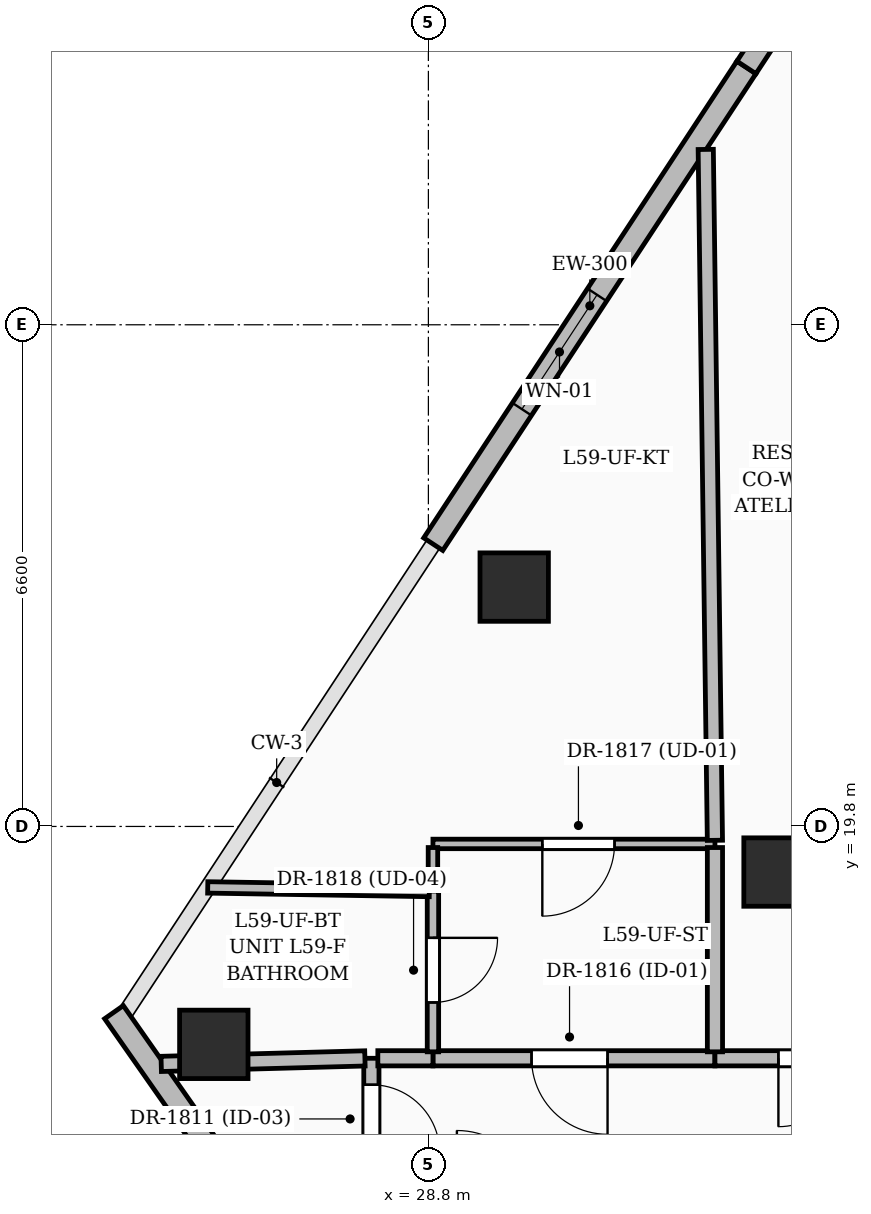
"""IFC4 building model, lengths in metres.
Left out: names, types, materials, properties, quantities, classifications, styles, units other than length and angle.
Written with IfcOpenShell. Run it as: python <this file> out.ifc"""

import sys

from ifc_helpers import new_model, si_unit, direction, frame, frame_2d, origin, origin_2d, place, context, subcontext, project, spatial, rectangle, extrude, element, fill, save


model = new_model("IFC4")
c1 = context("Model", 3, precision=1e-05, world=origin(), true_north=direction((0.0, 1.0)))
c2 = subcontext(c1, "Body", "Model", "MODEL_VIEW")
j1 = project(units=[si_unit("LENGTHUNIT", "METRE"), si_unit("PLANEANGLEUNIT", "RADIAN")], contexts=[c1])
p1 = place(None, origin())
s1 = spatial("IfcSite", under=j1, at=p1, CompositionType="ELEMENT")
p2 = place(p1, origin())
s2 = spatial("IfcBuilding", under=s1, at=p2, CompositionType="ELEMENT")
p3 = place(p2, frame((0.0, 0.0, 229.5)))
s3 = spatial("IfcBuildingStorey", under=s2, at=p3, CompositionType="ELEMENT", Elevation=229.5)
for number, where, z_axis, x_axis in (
    (1, (33.4, 19.2, 0.0), (0.0, 0.0, 1.0), (1.0, 0.0, 0.0)),
    (2, (29.929, 22.949, 0.0), (0.0, 0.0, 1.0), (1.0, 0.0, 0.0)),
    (3, (25.977, 16.933, 0.0), (0.0, 0.0, 1.0), (1.0, 0.0, 0.0)),
):
    element("IfcColumn", number, at=place(p3, frame(where, z_axis=z_axis, x_axis=x_axis)), inside=s3, PredefinedType="COLUMN", context=c2, shape_type="SweptSolid", body=[
        extrude(rectangle(XDim=0.9, YDim=0.9, at=origin_2d()), origin(), (0.0, 0.0, 1.0), 3.75),
    ])
p4 = place(p3, frame((26.151, 15.232, 0.0), z_axis=(0.0, 0.0, 1.0), x_axis=(-0.573607655321, 0.819130183644, 0.0)))
e4 = element("IfcWall", 4, at=p4, inside=s3, PredefinedType="SOLIDWALL", context=c2, shape_type="SweptSolid", body=[
    extrude(rectangle(XDim=2.593, YDim=0.3, at=frame_2d((1.297, 0.0))), origin(), (0.0, 0.0, 1.0), 2.825),
])
p5 = place(p3, frame((28.864, 23.514, 0.0), z_axis=(0.0, 0.0, 1.0), x_axis=(0.549033751048, 0.835800179595, 0.0)))
e5 = element("IfcWall", 5, at=p5, inside=s3, PredefinedType="SOLIDWALL", context=c2, shape_type="SweptSolid", body=[
    extrude(rectangle(XDim=7.504, YDim=0.3, at=frame_2d((3.752, 0.0))), origin(), (0.0, 0.0, 1.0), 3.5),
])
p6 = place(p5, frame((2.125, 0.0, 0.6)))
e6 = element("IfcOpeningElement", 6, at=p6, cuts=e5, PredefinedType="OPENING", context=c2, shape_type="SweptSolid", body=[
    extrude(rectangle(XDim=1.8, YDim=2.1, at=frame_2d((0.9, 1.05))), frame((0.0, 0.16, 0.0), z_axis=(0.0, -1.0, 0.0), x_axis=(1.0, 0.0, 0.0)), (0.0, 0.0, 1.0), 0.32),
])
p7 = place(p3, frame((32.984, 29.785, 0.0), z_axis=(0.0, 0.0, 1.0), x_axis=(0.549071408683, 0.835775441232, 0.0)))
e7 = element("IfcWall", 7, at=p7, inside=s3, PredefinedType="SOLIDWALL", context=c2, shape_type="SweptSolid", body=[
    extrude(rectangle(XDim=7.504, YDim=0.3, at=frame_2d((3.752, 0.0))), origin(), (0.0, 0.0, 1.0), 3.5),
])
p8 = place(p7, frame((0.85, 0.0, 0.55)))
e8 = element("IfcOpeningElement", 8, at=p8, cuts=e7, PredefinedType="OPENING", context=c2, shape_type="SweptSolid", body=[
    extrude(rectangle(XDim=1.6, YDim=2.2, at=frame_2d((0.8, 1.1))), frame((0.0, 0.16, 0.0), z_axis=(0.0, -1.0, 0.0), x_axis=(1.0, 0.0, 0.0)), (0.0, 0.0, 1.0), 0.32),
])
p9 = place(p7, frame((4.225, 0.0, 0.55)))
e9 = element("IfcOpeningElement", 9, at=p9, cuts=e7, PredefinedType="OPENING", context=c2, shape_type="SweptSolid", body=[
    extrude(rectangle(XDim=1.6, YDim=2.2, at=frame_2d((0.8, 1.1))), frame((0.0, 0.16, 0.0), z_axis=(0.0, -1.0, 0.0), x_axis=(1.0, 0.0, 0.0)), (0.0, 0.0, 1.0), 0.32),
])
p10 = place(p3, frame((28.05, 16.75, 0.0), z_axis=(0.0, 0.0, 1.0), x_axis=(0.0, -1.0, 0.0)))
e10 = element("IfcWall", 10, at=p10, inside=s3, PredefinedType="PARTITIONING", context=c2, shape_type="SweptSolid", body=[
    extrude(rectangle(XDim=1.7, YDim=0.2, at=frame_2d((0.85, 0.0))), origin(), (0.0, 0.0, 1.0), 3.5),
])
p11 = place(p10, frame((0.348, 0.0, 0.0)))
e11 = element("IfcOpeningElement", 11, at=p11, cuts=e10, PredefinedType="OPENING", context=c2, shape_type="SweptSolid", body=[
    extrude(rectangle(XDim=0.9, YDim=2.1, at=frame_2d((0.45, 1.05))), frame((0.0, 0.11, 0.0), z_axis=(0.0, -1.0, 0.0), x_axis=(1.0, 0.0, 0.0)), (0.0, 0.0, 1.0), 0.22),
])
p12 = place(p3, frame((32.57, 16.75, 0.0), z_axis=(0.0, 0.0, 1.0), x_axis=(-1.0, 0.0, 0.0)))
e12 = element("IfcWall", 12, at=p12, inside=s3, PredefinedType="PARTITIONING", context=c2, shape_type="SweptSolid", body=[
    extrude(rectangle(XDim=3.71, YDim=0.2, at=frame_2d((1.855, 0.0))), origin(), (0.0, 0.0, 1.0), 3.5),
])
p13 = place(p12, frame((1.413, 0.0, 0.0)))
e13 = element("IfcOpeningElement", 13, at=p13, cuts=e12, PredefinedType="OPENING", context=c2, shape_type="SweptSolid", body=[
    extrude(rectangle(XDim=1.0, YDim=2.2, at=frame_2d((0.5, 1.1))), frame((0.0, 0.11, 0.0), z_axis=(0.0, -1.0, 0.0), x_axis=(1.0, 0.0, 0.0)), (0.0, 0.0, 1.0), 0.22),
])
p14 = place(p3, frame((28.86, 16.75, 0.0), z_axis=(0.0, 0.0, 1.0), x_axis=(-1.0, 0.0, 0.0)))
e14 = element("IfcWall", 14, at=p14, inside=s3, PredefinedType="PARTITIONING", context=c2, shape_type="SweptSolid", body=[
    extrude(rectangle(XDim=0.725, YDim=0.2, at=frame_2d((0.363, 0.0))), origin(), (0.0, 0.0, 1.0), 3.5),
])
p15 = place(p3, frame((35.14, 16.75, 0.0), z_axis=(0.0, 0.0, 1.0), x_axis=(-1.0, 0.0, 0.0)))
e15 = element("IfcWall", 15, at=p15, inside=s3, PredefinedType="PARTITIONING", context=c2, shape_type="SweptSolid", body=[
    extrude(rectangle(XDim=2.57, YDim=0.2, at=frame_2d((1.285, 0.0))), origin(), (0.0, 0.0, 1.0), 2.685),
])
p16 = place(p15, frame((0.835, 0.0, 0.0)))
e16 = element("IfcOpeningElement", 16, at=p16, cuts=e15, PredefinedType="OPENING", context=c2, shape_type="SweptSolid", body=[
    extrude(rectangle(XDim=0.9, YDim=2.1, at=frame_2d((0.45, 1.05))), frame((0.0, 0.11, 0.0), z_axis=(0.0, -1.0, 0.0), x_axis=(1.0, 0.0, 0.0)), (0.0, 0.0, 1.0), 0.22),
])
p17 = place(p3, frame((27.965, 16.749, 0.0), z_axis=(0.0, 0.0, 1.0), x_axis=(-0.999634238385, -0.027044212862, 0.0)))
e17 = element("IfcWall", 17, at=p17, inside=s3, PredefinedType="PARTITIONING", context=c2, shape_type="SweptSolid", body=[
    extrude(rectangle(XDim=2.681, YDim=0.2, at=frame_2d((1.341, 0.0))), origin(), (0.0, 0.0, 1.0), 2.685),
])
p18 = place(p3, frame((32.57, 19.57, 0.0), z_axis=(0.0, 0.0, 1.0), x_axis=(-1.0, 0.0, 0.0)))
e18 = element("IfcWall", 18, at=p18, inside=s3, PredefinedType="PARTITIONING", context=c2, shape_type="SweptSolid", body=[
    extrude(rectangle(XDim=3.71, YDim=0.125, at=frame_2d((1.855, 0.0))), origin(), (0.0, 0.0, 1.0), 3.01),
])
p19 = place(p18, frame((1.321, 0.0, 0.0)))
e19 = element("IfcOpeningElement", 19, at=p19, cuts=e18, PredefinedType="OPENING", context=c2, shape_type="SweptSolid", body=[
    extrude(rectangle(XDim=0.95, YDim=2.2, at=frame_2d((0.475, 1.1))), frame((0.0, 0.072, 0.0), z_axis=(0.0, -1.0, 0.0), x_axis=(1.0, 0.0, 0.0)), (0.0, 0.0, 1.0), 0.145),
])
p20 = place(p3, frame((28.86, 19.522, 0.0), z_axis=(0.0, 0.0, 1.0), x_axis=(0.0, -1.0, 0.0)))
e20 = element("IfcWall", 20, at=p20, inside=s3, PredefinedType="PARTITIONING", context=c2, shape_type="SweptSolid", body=[
    extrude(rectangle(XDim=0.573, YDim=0.125, at=frame_2d((0.286, 0.0))), origin(), (0.0, 0.0, 1.0), 3.5),
])
p21 = place(p3, frame((28.86, 18.95, 0.0), z_axis=(0.0, 0.0, 1.0), x_axis=(0.0, -1.0, 0.0)))
e21 = element("IfcWall", 21, at=p21, inside=s3, PredefinedType="PARTITIONING", context=c2, shape_type="SweptSolid", body=[
    extrude(rectangle(XDim=2.115, YDim=0.15, at=frame_2d((1.058, 0.0))), origin(), (0.0, 0.0, 1.0), 3.01),
])
p22 = place(p21, frame((0.615, 0.0, 0.0)))
e22 = element("IfcOpeningElement", 22, at=p22, cuts=e21, PredefinedType="OPENING", context=c2, shape_type="SweptSolid", body=[
    extrude(rectangle(XDim=0.85, YDim=2.1, at=frame_2d((0.425, 1.05))), frame((0.0, 0.085, 0.0), z_axis=(0.0, -1.0, 0.0), x_axis=(1.0, 0.0, 0.0)), (0.0, 0.0, 1.0), 0.17),
])
p23 = place(p3, frame((32.57, 16.835, 0.0), z_axis=(0.0, 0.0, 1.0), x_axis=(0.0, 1.0, 0.0)))
e23 = element("IfcWall", 23, at=p23, inside=s3, PredefinedType="PARTITIONING", context=c2, shape_type="SweptSolid", body=[
    extrude(rectangle(XDim=2.688, YDim=0.2, at=frame_2d((1.344, 0.0))), origin(), (0.0, 0.0, 1.0), 3.5),
])
p24 = place(p3, frame((25.897, 18.998, 0.0), z_axis=(0.0, 0.0, 1.0), x_axis=(0.999868073093, -0.016243041884, 0.0)))
e24 = element("IfcWall", 24, at=p24, inside=s3, PredefinedType="PARTITIONING", context=c2, shape_type="SweptSolid", body=[
    extrude(rectangle(XDim=2.916, YDim=0.15, at=frame_2d((1.458, 0.0))), origin(), (0.0, 0.0, 1.0), 2.82),
])
p25 = place(p3, frame((32.57, 19.617, 0.0), z_axis=(0.0, 0.0, 1.0), x_axis=(-0.013267344969, 0.999911984905, 0.0)))
e25 = element("IfcWall", 25, at=p25, inside=s3, PredefinedType="PARTITIONING", context=c2, shape_type="SweptSolid", body=[
    extrude(rectangle(XDim=9.09, YDim=0.2, at=frame_2d((4.545, 0.0))), origin(), (0.0, 0.0, 1.0), 2.685),
])
p26 = place(p6, origin())
e26 = element("IfcWindow", 26, at=p26, inside=s3, PartitioningType="SINGLE_PANEL", PredefinedType="WINDOW", context=c2, shape_type="SweptSolid", body=[
    extrude(rectangle(XDim=1.8, YDim=2.1, at=frame_2d((0.9, 1.05))), frame((0.0, 0.03, 0.0), z_axis=(0.0, -1.0, 0.0), x_axis=(1.0, 0.0, 0.0)), (0.0, 0.0, 1.0), 0.06),
])
fill(e6, e26)
p27 = place(p11, origin())
e27 = element("IfcDoor", 27, at=p27, inside=s3, OperationType="SINGLE_SWING_RIGHT", PredefinedType="DOOR", context=c2, shape_type="SweptSolid", body=[
    extrude(rectangle(XDim=0.9, YDim=2.1, at=frame_2d((0.45, 1.05))), frame((0.0, 0.025, 0.0), z_axis=(0.0, -1.0, 0.0), x_axis=(1.0, 0.0, 0.0)), (0.0, 0.0, 1.0), 0.05),
])
fill(e11, e27)
p28 = place(p16, origin())
e28 = element("IfcDoor", 28, at=p28, inside=s3, OperationType="SINGLE_SWING_RIGHT", PredefinedType="DOOR", context=c2, shape_type="SweptSolid", body=[
    extrude(rectangle(XDim=0.9, YDim=2.1, at=frame_2d((0.45, 1.05))), frame((0.0, 0.025, 0.0), z_axis=(0.0, -1.0, 0.0), x_axis=(1.0, 0.0, 0.0)), (0.0, 0.0, 1.0), 0.05),
])
fill(e16, e28)
p29 = place(p13, origin())
e29 = element("IfcDoor", 29, at=p29, inside=s3, OperationType="SINGLE_SWING_LEFT", PredefinedType="DOOR", context=c2, shape_type="SweptSolid", body=[
    extrude(rectangle(XDim=1.0, YDim=2.2, at=frame_2d((0.5, 1.1))), frame((0.0, 0.025, 0.0), z_axis=(0.0, -1.0, 0.0), x_axis=(1.0, 0.0, 0.0)), (0.0, 0.0, 1.0), 0.05),
])
fill(e13, e29)
p30 = place(p19, origin())
e30 = element("IfcDoor", 30, at=p30, inside=s3, OperationType="SINGLE_SWING_RIGHT", PredefinedType="DOOR", context=c2, shape_type="SweptSolid", body=[
    extrude(rectangle(XDim=0.95, YDim=2.2, at=frame_2d((0.475, 1.1))), frame((0.0, 0.025, 0.0), z_axis=(0.0, -1.0, 0.0), x_axis=(1.0, 0.0, 0.0)), (0.0, 0.0, 1.0), 0.05),
])
fill(e19, e30)
p31 = place(p22, origin())
e31 = element("IfcDoor", 31, at=p31, inside=s3, OperationType="SINGLE_SWING_LEFT", PredefinedType="DOOR", context=c2, shape_type="SweptSolid", body=[
    extrude(rectangle(XDim=0.85, YDim=2.1, at=frame_2d((0.425, 1.05))), frame((0.0, 0.025, 0.0), z_axis=(0.0, -1.0, 0.0), x_axis=(1.0, 0.0, 0.0)), (0.0, 0.0, 1.0), 0.05),
])
fill(e22, e31)
save(model, sys.argv[1])
